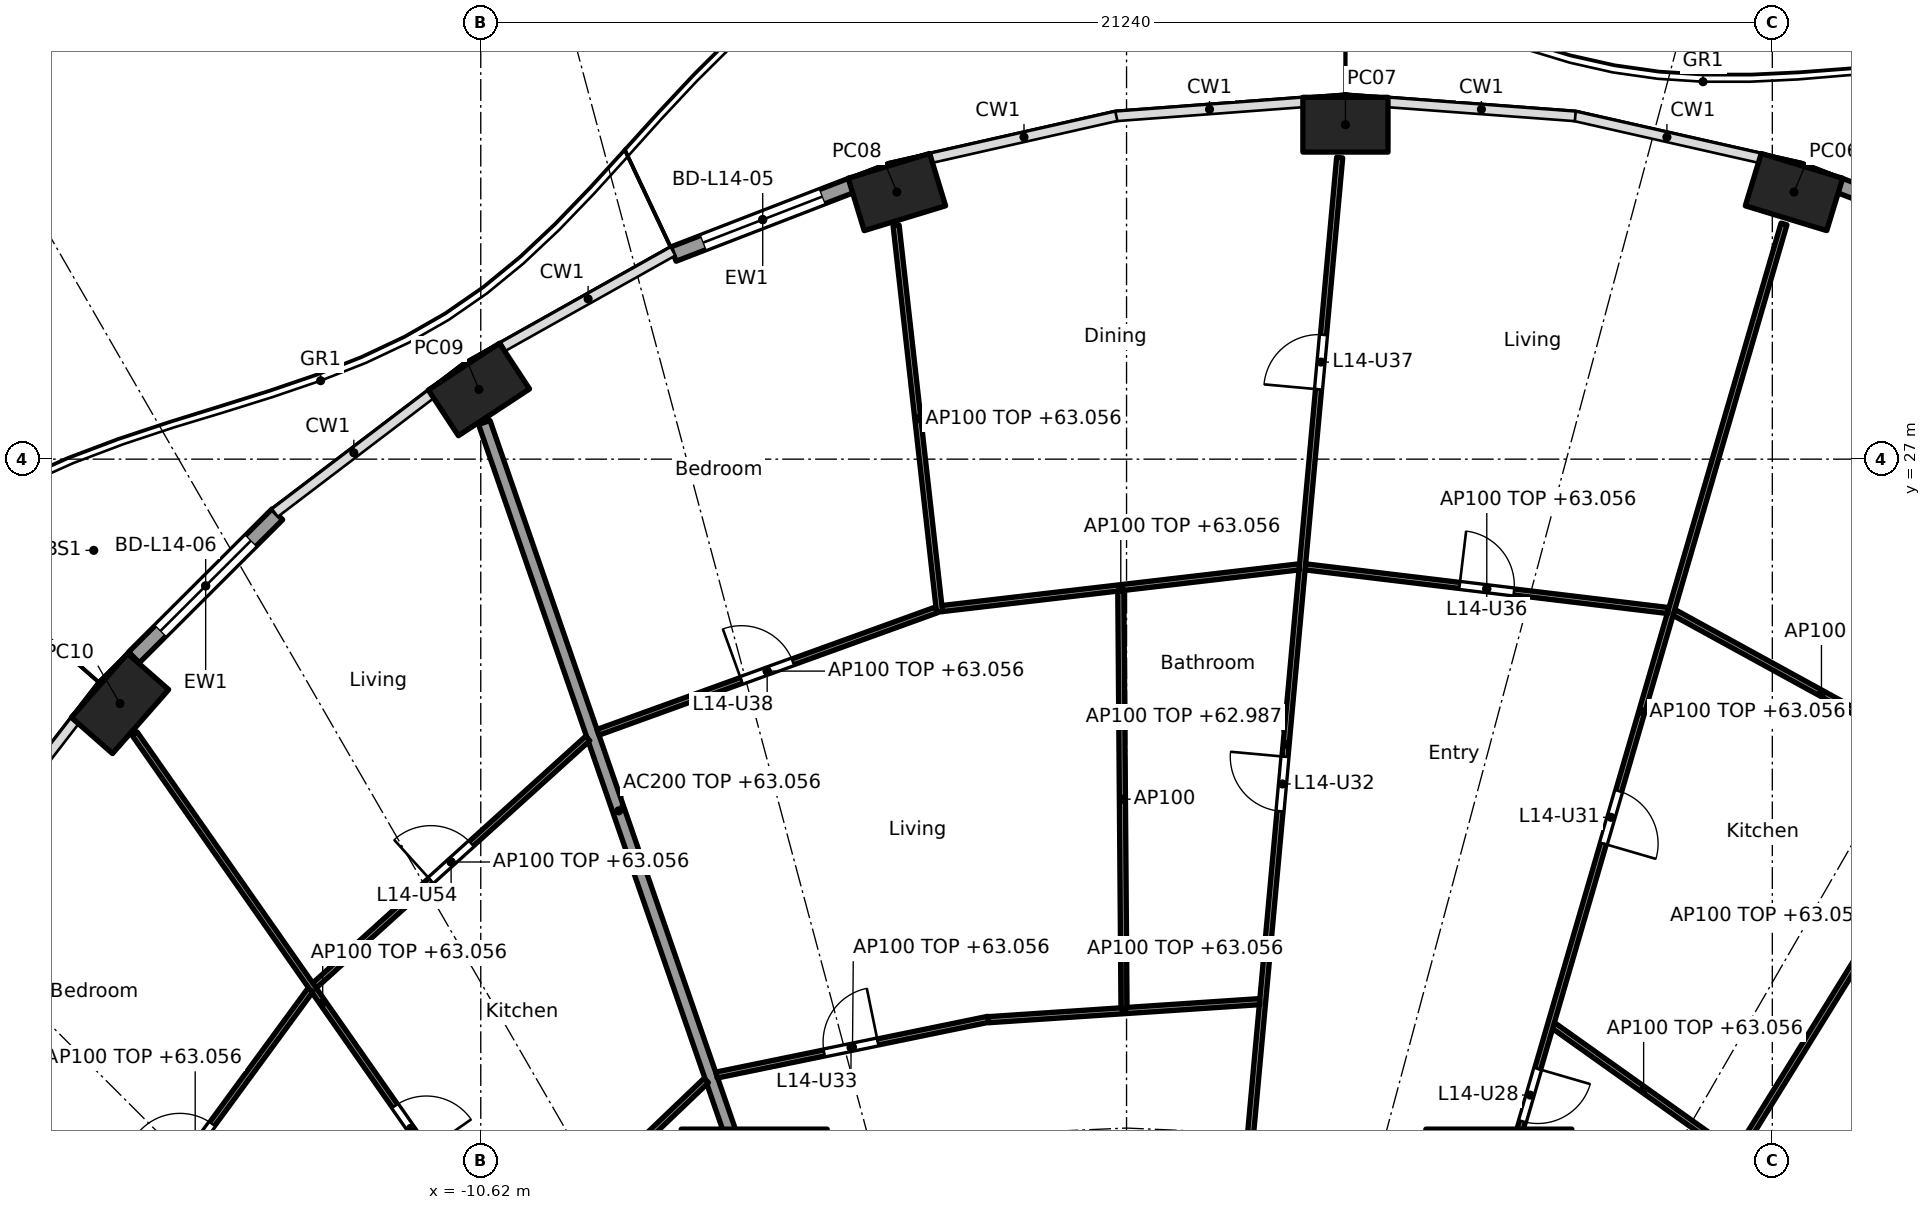
"""IFC4 building model, lengths in metres.
Left out: names, types, materials, properties, quantities, classifications, styles, units other than length and angle.
Written with IfcOpenShell. Run it as: python <this file> out.ifc"""

import sys

from ifc_helpers import new_model, si_unit, direction, frame, frame_2d, origin, origin_2d, place, context, subcontext, project, spatial, rectangle, hollow_rectangle, extrude, element, fill, save


model = new_model("IFC4")
c1 = context("Model", 3, precision=1e-05, world=origin(), true_north=direction((0.0, 1.0)))
c2 = subcontext(c1, "Body", "Model", "MODEL_VIEW")
j1 = project(units=[si_unit("LENGTHUNIT", "METRE"), si_unit("PLANEANGLEUNIT", "RADIAN")], contexts=[c1])
p1 = place(None, origin())
s1 = spatial("IfcSite", under=j1, at=p1, CompositionType="ELEMENT")
p2 = place(p1, origin())
s2 = spatial("IfcBuilding", under=s1, at=p2, CompositionType="ELEMENT")
p3 = place(p2, frame((0.0, 0.0, 60.3)))
s3 = spatial("IfcBuildingStorey", under=s2, at=p3, CompositionType="ELEMENT", Elevation=60.3)
for number, where, z_axis, x_axis in (
    (1, (10.976, 31.393, 0.0), (0.0, 0.0, 1.0), (-0.957, 0.292, 0.0)),
    (2, (3.6, 32.5, 0.0), (0.0, 0.0, 1.0), (-1.0, 0.0, 0.0)),
    (3, (-3.776, 31.393, 0.0), (0.0, 0.0, 1.0), (-0.957, -0.292, 0.0)),
    (4, (-10.65, 28.146, 0.0), (0.0, 0.0, 1.0), (-0.836, -0.549, 0.0)),
    (5, (-16.552, 22.981, 0.0), (0.0, 0.0, 1.0), (-0.66, -0.751, 0.0)),
):
    element("IfcColumn", number, at=place(p3, frame(where, z_axis=z_axis, x_axis=x_axis)), inside=s3, PredefinedType="COLUMN", context=c2, shape_type="SweptSolid", body=[
        extrude(hollow_rectangle(XDim=1.4, YDim=0.9, WallThickness=0.05, at=origin_2d()), origin(), (0.0, 0.0, 1.0), 3.7),
    ])
for number, where, z_axis, x_axis in (
    (6, (6.123, 14.782, 0.0), (0.0, 0.0, 1.0), (1.0, 0.0, 0.0)),
    (7, (-6.123, 14.782, 0.0), (0.0, 0.0, 1.0), (1.0, 0.0, 0.0)),
):
    element("IfcColumn", number, at=place(p3, frame(where, z_axis=z_axis, x_axis=x_axis)), inside=s3, PredefinedType="COLUMN", context=c2, shape_type="SweptSolid", body=[
        extrude(rectangle(XDim=2.4, YDim=2.4, at=origin_2d()), origin(), (0.0, 0.0, 1.0), 3.7),
    ])
p4 = place(p3, frame((11.714, 31.507, 0.0), z_axis=(0.0, 0.0, 1.0), x_axis=(0.932809381943, -0.360370166577, 0.0)))
e8 = element("IfcWall", 8, at=p4, inside=s3, PredefinedType="SOLIDWALL", context=c2, shape_type="SweptSolid", body=[
    extrude(rectangle(XDim=3.151, YDim=0.25, at=frame_2d((1.575, 0.0))), origin(), (0.0, 0.0, 1.0), 3.44),
])
p5 = place(p4, frame((0.525, 0.0, 0.0)))
e9 = element("IfcOpeningElement", 9, at=p5, cuts=e8, PredefinedType="OPENING", context=c2, shape_type="SweptSolid", body=[
    extrude(rectangle(XDim=2.1, YDim=2.4, at=frame_2d((1.05, 1.2))), frame((0.0, 0.135, 0.0), z_axis=(0.0, -1.0, 0.0), x_axis=(1.0, 0.0, 0.0)), (0.0, 0.0, 1.0), 0.27),
])
p6 = place(p3, frame((-7.453, 30.371, 0.0), z_axis=(0.0, 0.0, 1.0), x_axis=(0.932809381943, 0.360370166577, 0.0)))
e10 = element("IfcWall", 10, at=p6, inside=s3, PredefinedType="SOLIDWALL", context=c2, shape_type="SweptSolid", body=[
    extrude(rectangle(XDim=3.151, YDim=0.25, at=frame_2d((1.575, 0.0))), origin(), (0.0, 0.0, 1.0), 3.44),
])
p7 = place(p6, frame((0.525, 0.0, 0.0)))
e11 = element("IfcOpeningElement", 11, at=p7, cuts=e10, PredefinedType="OPENING", context=c2, shape_type="SweptSolid", body=[
    extrude(rectangle(XDim=2.1, YDim=2.4, at=frame_2d((1.05, 1.2))), frame((0.0, 0.135, 0.0), z_axis=(0.0, -1.0, 0.0), x_axis=(1.0, 0.0, 0.0)), (0.0, 0.0, 1.0), 0.27),
])
p8 = place(p3, frame((-16.322, 23.74, 0.0), z_axis=(0.0, 0.0, 1.0), x_axis=(0.707803094595, 0.706409781417, 0.0)))
e12 = element("IfcWall", 12, at=p8, inside=s3, PredefinedType="SOLIDWALL", context=c2, shape_type="SweptSolid", body=[
    extrude(rectangle(XDim=3.329, YDim=0.25, at=frame_2d((1.665, 0.0))), origin(), (0.0, 0.0, 1.0), 3.44),
])
p9 = place(p8, frame((0.615, 0.0, 0.0)))
e13 = element("IfcOpeningElement", 13, at=p9, cuts=e12, PredefinedType="OPENING", context=c2, shape_type="SweptSolid", body=[
    extrude(rectangle(XDim=2.1, YDim=2.4, at=frame_2d((1.05, 1.2))), frame((0.0, 0.135, 0.0), z_axis=(0.0, -1.0, 0.0), x_axis=(1.0, 0.0, 0.0)), (0.0, 0.0, 1.0), 0.27),
])
p10 = place(p3, frame((-6.139, 14.829, 0.0), z_axis=(0.0, 0.0, 1.0), x_axis=(-0.327178799566, 0.944962450637, 0.0)))
e14 = element("IfcWall", 14, at=p10, inside=s3, PredefinedType="PARTITIONING", context=c2, shape_type="SweptSolid", body=[
    extrude(rectangle(XDim=13.517, YDim=0.2, at=frame_2d((6.759, 0.0))), origin(), (0.0, 0.0, 1.0), 2.756),
])
p11 = place(p3, frame((10.003, 15.503, 0.0), z_axis=(0.0, 0.0, 1.0), x_axis=(0.52645953022, 0.850200189979, 0.0)))
e15 = element("IfcWall", 15, at=p11, inside=s3, PredefinedType="PARTITIONING", context=c2, shape_type="SweptSolid", body=[
    extrude(rectangle(XDim=7.45, YDim=0.1, at=frame_2d((3.725, 0.0))), origin(), (0.0, 0.0, 1.0), 2.756),
])
p12 = place(p3, frame((9.989, 15.574, 0.0), z_axis=(0.0, 0.0, 1.0), x_axis=(-0.81494477814, 0.57953861699, 0.0)))
e16 = element("IfcWall", 16, at=p12, inside=s3, PredefinedType="PARTITIONING", context=c2, shape_type="SweptSolid", body=[
    extrude(rectangle(XDim=3.644, YDim=0.1, at=frame_2d((1.822, 0.0))), origin(), (0.0, 0.0, 1.0), 2.756),
])
p13 = place(p3, frame((13.855, 21.818, 0.0), z_axis=(0.0, 0.0, 1.0), x_axis=(-0.876794415294, 0.480865421203, 0.0)))
e17 = element("IfcWall", 17, at=p13, inside=s3, PredefinedType="PARTITIONING", context=c2, shape_type="SweptSolid", body=[
    extrude(rectangle(XDim=5.536, YDim=0.1, at=frame_2d((2.768, 0.0))), origin(), (0.0, 0.0, 1.0), 2.756),
])
p14 = place(p3, frame((6.137, 14.83, 0.0), z_axis=(0.0, 0.0, 1.0), x_axis=(0.27985745069, 0.960041565399, 0.0)))
e18 = element("IfcWall", 18, at=p14, inside=s3, PredefinedType="PARTITIONING", context=c2, shape_type="SweptSolid", body=[
    extrude(rectangle(XDim=16.705, YDim=0.1, at=frame_2d((8.353, 0.0))), origin(), (0.0, 0.0, 1.0), 2.756),
])
p15 = place(p14, frame((1.334, 0.0, 0.0)))
e19 = element("IfcOpeningElement", 19, at=p15, cuts=e18, PredefinedType="OPENING", context=c2, shape_type="SweptSolid", body=[
    extrude(rectangle(XDim=0.9, YDim=2.1, at=frame_2d((0.45, 1.05))), frame((0.0, 0.06, 0.0), z_axis=(0.0, -1.0, 0.0), x_axis=(1.0, 0.0, 0.0)), (0.0, 0.0, 1.0), 0.12),
])
p16 = place(p14, frame((6.091, 0.0, 0.0)))
e20 = element("IfcOpeningElement", 20, at=p16, cuts=e18, PredefinedType="OPENING", context=c2, shape_type="SweptSolid", body=[
    extrude(rectangle(XDim=0.9, YDim=2.1, at=frame_2d((0.45, 1.05))), frame((0.0, 0.06, 0.0), z_axis=(0.0, -1.0, 0.0), x_axis=(1.0, 0.0, 0.0)), (0.0, 0.0, 1.0), 0.12),
])
p17 = place(p3, frame((8.907, 24.51, 0.0), z_axis=(0.0, 0.0, 1.0), x_axis=(-0.992836798252, 0.119478416615, 0.0)))
e21 = element("IfcWall", 21, at=p17, inside=s3, PredefinedType="PARTITIONING", context=c2, shape_type="SweptSolid", body=[
    extrude(rectangle(XDim=6.01, YDim=0.1, at=frame_2d((3.005, 0.0))), origin(), (0.0, 0.0, 1.0), 2.756),
])
p18 = place(p17, frame((2.555, 0.0, 0.0)))
e22 = element("IfcOpeningElement", 22, at=p18, cuts=e21, PredefinedType="OPENING", context=c2, shape_type="SweptSolid", body=[
    extrude(rectangle(XDim=0.9, YDim=2.1, at=frame_2d((0.45, 1.05))), frame((0.0, 0.06, 0.0), z_axis=(0.0, -1.0, 0.0), x_axis=(1.0, 0.0, 0.0)), (0.0, 0.0, 1.0), 0.12),
])
p19 = place(p3, frame((1.744, 12.664, 0.0), z_axis=(0.0, 0.0, 1.0), x_axis=(0.090893639596, 0.995860605849, 0.0)))
e23 = element("IfcWall", 23, at=p19, inside=s3, PredefinedType="PARTITIONING", context=c2, shape_type="SweptSolid", body=[
    extrude(rectangle(XDim=19.374, YDim=0.1, at=frame_2d((9.687, 0.0))), origin(), (0.0, 0.0, 1.0), 2.687),
])
p20 = place(p19, frame((2.27, 0.0, 0.0)))
e24 = element("IfcOpeningElement", 24, at=p20, cuts=e23, PredefinedType="OPENING", context=c2, shape_type="SweptSolid", body=[
    extrude(rectangle(XDim=0.9, YDim=2.1, at=frame_2d((0.45, 1.05))), frame((0.0, 0.06, 0.0), z_axis=(0.0, -1.0, 0.0), x_axis=(1.0, 0.0, 0.0)), (0.0, 0.0, 1.0), 0.12),
])
p21 = place(p19, frame((8.582, 0.0, 0.0)))
e25 = element("IfcOpeningElement", 25, at=p21, cuts=e23, PredefinedType="OPENING", context=c2, shape_type="SweptSolid", body=[
    extrude(rectangle(XDim=0.9, YDim=2.1, at=frame_2d((0.45, 1.05))), frame((0.0, 0.06, 0.0), z_axis=(0.0, -1.0, 0.0), x_axis=(1.0, 0.0, 0.0)), (0.0, 0.0, 1.0), 0.12),
])
p22 = place(p19, frame((15.548, 0.0, 0.0)))
e26 = element("IfcOpeningElement", 26, at=p22, cuts=e23, PredefinedType="OPENING", context=c2, shape_type="SweptSolid", body=[
    extrude(rectangle(XDim=0.9, YDim=2.1, at=frame_2d((0.45, 1.05))), frame((0.0, 0.06, 0.0), z_axis=(0.0, -1.0, 0.0), x_axis=(1.0, 0.0, 0.0)), (0.0, 0.0, 1.0), 0.12),
])
p23 = place(p3, frame((2.188, 18.079, 0.0), z_axis=(0.0, 0.0, 1.0), x_axis=(-0.997791437766, -0.066424744789, 0.0)))
e27 = element("IfcWall", 27, at=p23, inside=s3, PredefinedType="PARTITIONING", context=c2, shape_type="SweptSolid", body=[
    extrude(rectangle(XDim=4.469, YDim=0.1, at=frame_2d((2.235, 0.0))), origin(), (0.0, 0.0, 1.0), 2.756),
])
p24 = place(p3, frame((2.842, 25.229, 0.0), z_axis=(0.0, 0.0, 1.0), x_axis=(-0.993255612046, -0.115945198862, 0.0)))
e28 = element("IfcWall", 28, at=p24, inside=s3, PredefinedType="PARTITIONING", context=c2, shape_type="SweptSolid", body=[
    extrude(rectangle(XDim=5.913, YDim=0.1, at=frame_2d((2.956, 0.0))), origin(), (0.0, 0.0, 1.0), 2.756),
])
p25 = place(p3, frame((-0.042, 17.98, 0.0), z_axis=(0.0, 0.0, 1.0), x_axis=(-0.007692080119, 0.999970415514, 0.0)))
e29 = element("IfcWall", 29, at=p25, inside=s3, PredefinedType="PARTITIONING", context=c2, shape_type="SweptSolid", body=[
    extrude(rectangle(XDim=6.856, YDim=0.1, at=frame_2d((3.428, 0.0))), origin(), (0.0, 0.0, 1.0), 3.44),
])
p26 = place(p3, frame((-2.272, 17.789, 0.0), z_axis=(0.0, 0.0, 1.0), x_axis=(-0.979595137747, -0.200981009307, 0.0)))
e30 = element("IfcWall", 30, at=p26, inside=s3, PredefinedType="PARTITIONING", context=c2, shape_type="SweptSolid", body=[
    extrude(rectangle(XDim=4.562, YDim=0.1, at=frame_2d((2.281, 0.0))), origin(), (0.0, 0.0, 1.0), 2.756),
])
p27 = place(p26, frame((1.856, 0.0, 0.0)))
e31 = element("IfcOpeningElement", 31, at=p27, cuts=e30, PredefinedType="OPENING", context=c2, shape_type="SweptSolid", body=[
    extrude(rectangle(XDim=0.9, YDim=2.1, at=frame_2d((0.45, 1.05))), frame((0.0, 0.06, 0.0), z_axis=(0.0, -1.0, 0.0), x_axis=(1.0, 0.0, 0.0)), (0.0, 0.0, 1.0), 0.12),
])
p28 = place(p3, frame((-3.075, 24.488, 0.0), z_axis=(0.0, 0.0, 1.0), x_axis=(-0.111705235978, 0.993741384997, 0.0)))
e32 = element("IfcWall", 32, at=p28, inside=s3, PredefinedType="PARTITIONING", context=c2, shape_type="SweptSolid", body=[
    extrude(rectangle(XDim=6.395, YDim=0.1, at=frame_2d((3.198, 0.0))), origin(), (0.0, 0.0, 1.0), 2.756),
])
p29 = place(p3, frame((-3.128, 24.521, 0.0), z_axis=(0.0, 0.0, 1.0), x_axis=(-0.940401494588, -0.340066212636, 0.0)))
e33 = element("IfcWall", 33, at=p29, inside=s3, PredefinedType="PARTITIONING", context=c2, shape_type="SweptSolid", body=[
    extrude(rectangle(XDim=5.917, YDim=0.1, at=frame_2d((2.958, 0.0))), origin(), (0.0, 0.0, 1.0), 2.756),
])
p30 = place(p29, frame((2.509, 0.0, 0.0)))
e34 = element("IfcOpeningElement", 34, at=p30, cuts=e33, PredefinedType="OPENING", context=c2, shape_type="SweptSolid", body=[
    extrude(rectangle(XDim=0.9, YDim=2.1, at=frame_2d((0.45, 1.05))), frame((0.0, 0.06, 0.0), z_axis=(0.0, -1.0, 0.0), x_axis=(1.0, 0.0, 0.0)), (0.0, 0.0, 1.0), 0.12),
])
p31 = place(p3, frame((-6.912, 16.782, 0.0), z_axis=(0.0, 0.0, 1.0), x_axis=(-0.722775679202, -0.691082713975, 0.0)))
e35 = element("IfcWall", 35, at=p31, inside=s3, PredefinedType="PARTITIONING", context=c2, shape_type="SweptSolid", body=[
    extrude(rectangle(XDim=4.437, YDim=0.1, at=frame_2d((2.219, 0.0))), origin(), (0.0, 0.0, 1.0), 2.756),
])
p32 = place(p3, frame((-8.861, 22.407, 0.0), z_axis=(0.0, 0.0, 1.0), x_axis=(-0.741713303551, -0.670717060567, 0.0)))
e36 = element("IfcWall", 36, at=p32, inside=s3, PredefinedType="PARTITIONING", context=c2, shape_type="SweptSolid", body=[
    extrude(rectangle(XDim=6.059, YDim=0.1, at=frame_2d((3.03, 0.0))), origin(), (0.0, 0.0, 1.0), 2.756),
])
p33 = place(p32, frame((2.58, 0.0, 0.0)))
e37 = element("IfcOpeningElement", 37, at=p33, cuts=e36, PredefinedType="OPENING", context=c2, shape_type="SweptSolid", body=[
    extrude(rectangle(XDim=0.9, YDim=2.1, at=frame_2d((0.45, 1.05))), frame((0.0, 0.06, 0.0), z_axis=(0.0, -1.0, 0.0), x_axis=(1.0, 0.0, 0.0)), (0.0, 0.0, 1.0), 0.12),
])
p34 = place(p3, frame((-10.126, 13.641, 0.0), z_axis=(0.0, 0.0, 1.0), x_axis=(-0.57313289907, 0.819462433552, 0.0)))
e38 = element("IfcWall", 38, at=p34, inside=s3, PredefinedType="PARTITIONING", context=c2, shape_type="SweptSolid", body=[
    extrude(rectangle(XDim=10.794, YDim=0.1, at=frame_2d((5.397, 0.0))), origin(), (0.0, 0.0, 1.0), 2.756),
])
p35 = place(p34, frame((2.424, 0.0, 0.0)))
e39 = element("IfcOpeningElement", 39, at=p35, cuts=e38, PredefinedType="OPENING", context=c2, shape_type="SweptSolid", body=[
    extrude(rectangle(XDim=0.9, YDim=2.1, at=frame_2d((0.45, 1.05))), frame((0.0, 0.06, 0.0), z_axis=(0.0, -1.0, 0.0), x_axis=(1.0, 0.0, 0.0)), (0.0, 0.0, 1.0), 0.12),
])
p36 = place(p3, frame((-13.421, 18.269, 0.0), z_axis=(0.0, 0.0, 1.0), x_axis=(-0.591206785834, -0.806520016109, 0.0)))
e40 = element("IfcWall", 40, at=p36, inside=s3, PredefinedType="PARTITIONING", context=c2, shape_type="SweptSolid", body=[
    extrude(rectangle(XDim=6.41, YDim=0.1, at=frame_2d((3.205, 0.0))), origin(), (0.0, 0.0, 1.0), 2.756),
])
p37 = place(p36, frame((2.73, 0.0, 0.0)))
e41 = element("IfcOpeningElement", 41, at=p37, cuts=e40, PredefinedType="OPENING", context=c2, shape_type="SweptSolid", body=[
    extrude(rectangle(XDim=0.9, YDim=2.1, at=frame_2d((0.45, 1.05))), frame((0.0, 0.06, 0.0), z_axis=(0.0, -1.0, 0.0), x_axis=(1.0, 0.0, 0.0)), (0.0, 0.0, 1.0), 0.12),
])
p38 = place(p7, origin())
e42 = element("IfcDoor", 42, at=p38, inside=s3, OperationType="SLIDING_TO_LEFT", PredefinedType="DOOR", context=c2, shape_type="SweptSolid", body=[
    extrude(rectangle(XDim=2.1, YDim=2.4, at=frame_2d((1.05, 1.2))), frame((0.0, 0.025, 0.0), z_axis=(0.0, -1.0, 0.0), x_axis=(1.0, 0.0, 0.0)), (0.0, 0.0, 1.0), 0.05),
])
fill(e11, e42)
p39 = place(p9, origin())
e43 = element("IfcDoor", 43, at=p39, inside=s3, OperationType="SLIDING_TO_LEFT", PredefinedType="DOOR", context=c2, shape_type="SweptSolid", body=[
    extrude(rectangle(XDim=2.1, YDim=2.4, at=frame_2d((1.05, 1.2))), frame((0.0, 0.025, 0.0), z_axis=(0.0, -1.0, 0.0), x_axis=(1.0, 0.0, 0.0)), (0.0, 0.0, 1.0), 0.05),
])
fill(e13, e43)
p40 = place(p15, frame((0.9, 0.0, 0.0), x_axis=(-1.0, 0.0, 0.0)))
e44 = element("IfcDoor", 44, at=p40, inside=s3, OperationType="SINGLE_SWING_LEFT", PredefinedType="DOOR", context=c2, shape_type="SweptSolid", body=[
    extrude(rectangle(XDim=0.9, YDim=2.1, at=frame_2d((0.45, 1.05))), frame((0.0, 0.025, 0.0), z_axis=(0.0, -1.0, 0.0), x_axis=(1.0, 0.0, 0.0)), (0.0, 0.0, 1.0), 0.05),
])
fill(e19, e44)
p41 = place(p16, frame((0.9, 0.0, 0.0), x_axis=(-1.0, 0.0, 0.0)))
e45 = element("IfcDoor", 45, at=p41, inside=s3, OperationType="SINGLE_SWING_RIGHT", PredefinedType="DOOR", context=c2, shape_type="SweptSolid", body=[
    extrude(rectangle(XDim=0.9, YDim=2.1, at=frame_2d((0.45, 1.05))), frame((0.0, 0.025, 0.0), z_axis=(0.0, -1.0, 0.0), x_axis=(1.0, 0.0, 0.0)), (0.0, 0.0, 1.0), 0.05),
])
fill(e20, e45)
p42 = place(p21, origin())
e46 = element("IfcDoor", 46, at=p42, inside=s3, OperationType="SINGLE_SWING_RIGHT", PredefinedType="DOOR", context=c2, shape_type="SweptSolid", body=[
    extrude(rectangle(XDim=0.9, YDim=2.1, at=frame_2d((0.45, 1.05))), frame((0.0, 0.025, 0.0), z_axis=(0.0, -1.0, 0.0), x_axis=(1.0, 0.0, 0.0)), (0.0, 0.0, 1.0), 0.05),
])
fill(e25, e46)
p43 = place(p27, frame((0.9, 0.0, 0.0), x_axis=(-1.0, 0.0, 0.0)))
e47 = element("IfcDoor", 47, at=p43, inside=s3, OperationType="SINGLE_SWING_RIGHT", PredefinedType="DOOR", context=c2, shape_type="SweptSolid", body=[
    extrude(rectangle(XDim=0.9, YDim=2.1, at=frame_2d((0.45, 1.05))), frame((0.0, 0.025, 0.0), z_axis=(0.0, -1.0, 0.0), x_axis=(1.0, 0.0, 0.0)), (0.0, 0.0, 1.0), 0.05),
])
fill(e31, e47)
p44 = place(p18, frame((0.9, 0.0, 0.0), x_axis=(-1.0, 0.0, 0.0)))
e48 = element("IfcDoor", 48, at=p44, inside=s3, OperationType="SINGLE_SWING_LEFT", PredefinedType="DOOR", context=c2, shape_type="SweptSolid", body=[
    extrude(rectangle(XDim=0.9, YDim=2.1, at=frame_2d((0.45, 1.05))), frame((0.0, 0.025, 0.0), z_axis=(0.0, -1.0, 0.0), x_axis=(1.0, 0.0, 0.0)), (0.0, 0.0, 1.0), 0.05),
])
fill(e22, e48)
p45 = place(p22, origin())
e49 = element("IfcDoor", 49, at=p45, inside=s3, OperationType="SINGLE_SWING_LEFT", PredefinedType="DOOR", context=c2, shape_type="SweptSolid", body=[
    extrude(rectangle(XDim=0.9, YDim=2.1, at=frame_2d((0.45, 1.05))), frame((0.0, 0.025, 0.0), z_axis=(0.0, -1.0, 0.0), x_axis=(1.0, 0.0, 0.0)), (0.0, 0.0, 1.0), 0.05),
])
fill(e26, e49)
p46 = place(p30, frame((0.9, 0.0, 0.0), x_axis=(-1.0, 0.0, 0.0)))
e50 = element("IfcDoor", 50, at=p46, inside=s3, OperationType="SINGLE_SWING_LEFT", PredefinedType="DOOR", context=c2, shape_type="SweptSolid", body=[
    extrude(rectangle(XDim=0.9, YDim=2.1, at=frame_2d((0.45, 1.05))), frame((0.0, 0.025, 0.0), z_axis=(0.0, -1.0, 0.0), x_axis=(1.0, 0.0, 0.0)), (0.0, 0.0, 1.0), 0.05),
])
fill(e34, e50)
p47 = place(p37, frame((0.9, 0.0, 0.0), x_axis=(-1.0, 0.0, 0.0)))
e51 = element("IfcDoor", 51, at=p47, inside=s3, OperationType="SINGLE_SWING_LEFT", PredefinedType="DOOR", context=c2, shape_type="SweptSolid", body=[
    extrude(rectangle(XDim=0.9, YDim=2.1, at=frame_2d((0.45, 1.05))), frame((0.0, 0.025, 0.0), z_axis=(0.0, -1.0, 0.0), x_axis=(1.0, 0.0, 0.0)), (0.0, 0.0, 1.0), 0.05),
])
fill(e41, e51)
p48 = place(p35, frame((0.9, 0.0, 0.0), x_axis=(-1.0, 0.0, 0.0)))
e52 = element("IfcDoor", 52, at=p48, inside=s3, OperationType="SINGLE_SWING_RIGHT", PredefinedType="DOOR", context=c2, shape_type="SweptSolid", body=[
    extrude(rectangle(XDim=0.9, YDim=2.1, at=frame_2d((0.45, 1.05))), frame((0.0, 0.025, 0.0), z_axis=(0.0, -1.0, 0.0), x_axis=(1.0, 0.0, 0.0)), (0.0, 0.0, 1.0), 0.05),
])
fill(e39, e52)
p49 = place(p33, frame((0.9, 0.0, 0.0), x_axis=(-1.0, 0.0, 0.0)))
e53 = element("IfcDoor", 53, at=p49, inside=s3, OperationType="SINGLE_SWING_LEFT", PredefinedType="DOOR", context=c2, shape_type="SweptSolid", body=[
    extrude(rectangle(XDim=0.9, YDim=2.1, at=frame_2d((0.45, 1.05))), frame((0.0, 0.025, 0.0), z_axis=(0.0, -1.0, 0.0), x_axis=(1.0, 0.0, 0.0)), (0.0, 0.0, 1.0), 0.05),
])
fill(e37, e53)
save(model, sys.argv[1])
